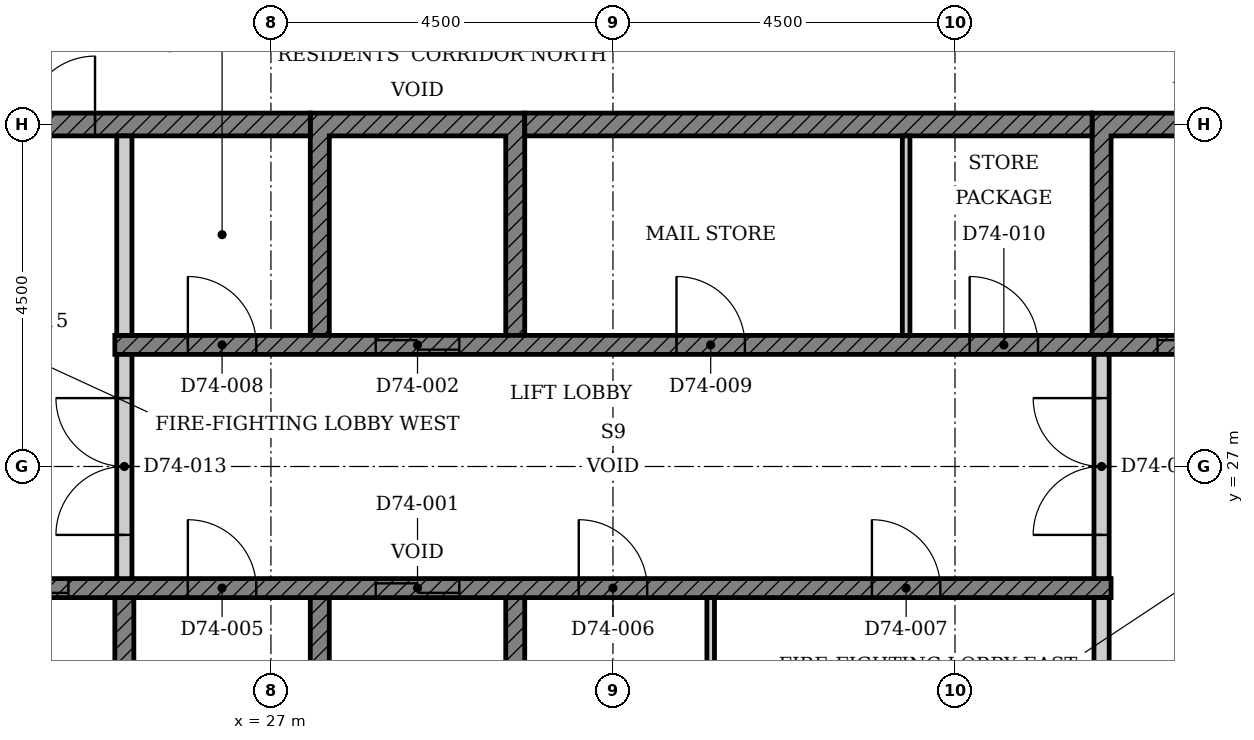
"""IFC4 building model, lengths in metres.
Left out: names, types, materials, properties, quantities, classifications, styles, units other than length and angle.
Written with IfcOpenShell. Run it as: python <this file> out.ifc"""

import sys

from ifc_helpers import new_model, si_unit, direction, frame, frame_2d, origin, place, context, subcontext, project, spatial, polyline, rectangle, outline, extrude, element, fill, save


model = new_model("IFC4")
c1 = context("Model", 3, precision=1e-05, world=origin(), true_north=direction((0.0, 1.0)))
c2 = subcontext(c1, "Body", "Model", "MODEL_VIEW")
j1 = project(units=[si_unit("LENGTHUNIT", "METRE"), si_unit("PLANEANGLEUNIT", "RADIAN")], contexts=[c1])
p1 = place(None, origin())
s1 = spatial("IfcSite", under=j1, at=p1, CompositionType="ELEMENT")
p2 = place(p1, origin())
s2 = spatial("IfcBuilding", under=s1, at=p2, CompositionType="ELEMENT")
p3 = place(p2, frame((0.0, 0.0, 290.8)))
s3 = spatial("IfcBuildingStorey", under=s2, at=p3, CompositionType="ELEMENT", Elevation=290.8)
p4 = place(p3, origin())
e1 = element("IfcWall", 1, at=p4, inside=s3, PredefinedType="SHEAR", context=c2, shape_type="SweptSolid", body=[
    extrude(outline(polyline([(22.375, 22.35), (25.197, 22.35), (25.197, 25.275), (24.947, 25.275), (24.947, 22.65), (22.625, 22.65), (22.625, 25.275), (22.375, 25.275), (22.375, 22.35)])), origin(), (0.0, 0.0, 1.0), 3.4),
])
p5 = place(p3, origin())
e2 = element("IfcWall", 2, at=p5, inside=s3, PredefinedType="SHEAR", context=c2, shape_type="SweptSolid", body=[
    extrude(outline(polyline([(27.518, 22.35), (30.339, 22.35), (30.339, 25.275), (30.089, 25.275), (30.089, 22.65), (27.768, 22.65), (27.768, 25.275), (27.518, 25.275), (27.518, 22.35)])), origin(), (0.0, 0.0, 1.0), 3.4),
])
p6 = place(p3, origin())
e3 = element("IfcWall", 3, at=p6, inside=s3, PredefinedType="SHEAR", context=c2, shape_type="SweptSolid", body=[
    extrude(outline(polyline([(27.518, 28.725), (27.768, 28.725), (27.768, 31.35), (30.089, 31.35), (30.089, 28.725), (30.339, 28.725), (30.339, 31.65), (27.518, 31.65), (27.518, 28.725)])), origin(), (0.0, 0.0, 1.0), 3.4),
])
p7 = place(p3, origin())
e4 = element("IfcWall", 4, at=p7, inside=s3, PredefinedType="SHEAR", context=c2, shape_type="SweptSolid", body=[
    extrude(outline(polyline([(37.803, 28.725), (38.053, 28.725), (38.053, 31.35), (40.375, 31.35), (40.375, 28.725), (40.625, 28.725), (40.625, 31.65), (37.803, 31.65), (37.803, 28.725)])), origin(), (0.0, 0.0, 1.0), 3.4),
])
p8 = place(p3, frame((18.15, 31.5, 0.0), z_axis=(0.0, 0.0, 1.0), x_axis=(1.0, 0.0, 0.0)))
e5 = element("IfcWall", 5, at=p8, inside=s3, PredefinedType="SHEAR", context=c2, shape_type="SweptSolid", body=[
    extrude(rectangle(XDim=9.368, YDim=0.3, at=frame_2d((4.684, 0.0))), origin(), (0.0, 0.0, 1.0), 3.4),
])
p9 = place(p8, frame((4.736, 0.0, 0.0)))
e6 = element("IfcOpeningElement", 6, at=p9, cuts=e5, PredefinedType="OPENING", context=c2, shape_type="SweptSolid", body=[
    extrude(rectangle(XDim=1.8, YDim=2.1, at=frame_2d((0.9, 1.05))), frame((0.0, 0.16, 0.0), z_axis=(0.0, -1.0, 0.0), x_axis=(1.0, 0.0, 0.0)), (0.0, 0.0, 1.0), 0.32),
])
p10 = place(p3, frame((30.339, 31.5, 0.0), z_axis=(0.0, 0.0, 1.0), x_axis=(1.0, 0.0, 0.0)))
e7 = element("IfcWall", 7, at=p10, inside=s3, PredefinedType="SHEAR", context=c2, shape_type="SweptSolid", body=[
    extrude(rectangle(XDim=7.464, YDim=0.3, at=frame_2d((3.732, 0.0))), origin(), (0.0, 0.0, 1.0), 3.4),
])
p11 = place(p3, frame((22.375, 25.4, 0.0), z_axis=(0.0, 0.0, 1.0), x_axis=(1.0, 0.0, 0.0)))
e8 = element("IfcWall", 8, at=p11, inside=s3, PredefinedType="SHEAR", context=c2, shape_type="SweptSolid", body=[
    extrude(rectangle(XDim=15.678, YDim=0.25, at=frame_2d((7.839, 0.0))), origin(), (0.0, 0.0, 1.0), 3.4),
])
p12 = place(p11, frame((6.004, 0.0, 0.0)))
e9 = element("IfcOpeningElement", 9, at=p12, cuts=e8, PredefinedType="OPENING", context=c2, shape_type="SweptSolid", body=[
    extrude(rectangle(XDim=1.1, YDim=2.1, at=frame_2d((0.55, 1.05))), frame((0.0, 0.135, 0.0), z_axis=(0.0, -1.0, 0.0), x_axis=(1.0, 0.0, 0.0)), (0.0, 0.0, 1.0), 0.27),
])
p13 = place(p11, frame((0.861, 0.0, 0.0)))
e10 = element("IfcOpeningElement", 10, at=p13, cuts=e8, PredefinedType="OPENING", context=c2, shape_type="SweptSolid", body=[
    extrude(rectangle(XDim=1.1, YDim=2.1, at=frame_2d((0.55, 1.05))), frame((0.0, 0.135, 0.0), z_axis=(0.0, -1.0, 0.0), x_axis=(1.0, 0.0, 0.0)), (0.0, 0.0, 1.0), 0.27),
])
p14 = place(p11, frame((3.532, 0.0, 0.0)))
e11 = element("IfcOpeningElement", 11, at=p14, cuts=e8, PredefinedType="OPENING", context=c2, shape_type="SweptSolid", body=[
    extrude(rectangle(XDim=0.9, YDim=2.1, at=frame_2d((0.45, 1.05))), frame((0.0, 0.135, 0.0), z_axis=(0.0, -1.0, 0.0), x_axis=(1.0, 0.0, 0.0)), (0.0, 0.0, 1.0), 0.27),
])
p15 = place(p11, frame((8.675, 0.0, 0.0)))
e12 = element("IfcOpeningElement", 12, at=p15, cuts=e8, PredefinedType="OPENING", context=c2, shape_type="SweptSolid", body=[
    extrude(rectangle(XDim=0.9, YDim=2.1, at=frame_2d((0.45, 1.05))), frame((0.0, 0.135, 0.0), z_axis=(0.0, -1.0, 0.0), x_axis=(1.0, 0.0, 0.0)), (0.0, 0.0, 1.0), 0.27),
])
p16 = place(p11, frame((12.532, 0.0, 0.0)))
e13 = element("IfcOpeningElement", 13, at=p16, cuts=e8, PredefinedType="OPENING", context=c2, shape_type="SweptSolid", body=[
    extrude(rectangle(XDim=0.9, YDim=2.1, at=frame_2d((0.45, 1.05))), frame((0.0, 0.135, 0.0), z_axis=(0.0, -1.0, 0.0), x_axis=(1.0, 0.0, 0.0)), (0.0, 0.0, 1.0), 0.27),
])
p17 = place(p3, frame((24.947, 28.6, 0.0), z_axis=(0.0, 0.0, 1.0), x_axis=(1.0, 0.0, 0.0)))
e14 = element("IfcWall", 14, at=p17, inside=s3, PredefinedType="SHEAR", context=c2, shape_type="SweptSolid", body=[
    extrude(rectangle(XDim=15.678, YDim=0.25, at=frame_2d((7.839, 0.0))), origin(), (0.0, 0.0, 1.0), 3.4),
])
p18 = place(p17, frame((3.432, 0.0, 0.0)))
e15 = element("IfcOpeningElement", 15, at=p18, cuts=e14, PredefinedType="OPENING", context=c2, shape_type="SweptSolid", body=[
    extrude(rectangle(XDim=1.1, YDim=2.1, at=frame_2d((0.55, 1.05))), frame((0.0, 0.135, 0.0), z_axis=(0.0, -1.0, 0.0), x_axis=(1.0, 0.0, 0.0)), (0.0, 0.0, 1.0), 0.27),
])
p19 = place(p17, frame((13.718, 0.0, 0.0)))
e16 = element("IfcOpeningElement", 16, at=p19, cuts=e14, PredefinedType="OPENING", context=c2, shape_type="SweptSolid", body=[
    extrude(rectangle(XDim=1.1, YDim=2.1, at=frame_2d((0.55, 1.05))), frame((0.0, 0.135, 0.0), z_axis=(0.0, -1.0, 0.0), x_axis=(1.0, 0.0, 0.0)), (0.0, 0.0, 1.0), 0.27),
])
p20 = place(p17, frame((0.961, 0.0, 0.0)))
e17 = element("IfcOpeningElement", 17, at=p20, cuts=e14, PredefinedType="OPENING", context=c2, shape_type="SweptSolid", body=[
    extrude(rectangle(XDim=0.9, YDim=2.1, at=frame_2d((0.45, 1.05))), frame((0.0, 0.135, 0.0), z_axis=(0.0, -1.0, 0.0), x_axis=(1.0, 0.0, 0.0)), (0.0, 0.0, 1.0), 0.27),
])
p21 = place(p17, frame((7.389, 0.0, 0.0)))
e18 = element("IfcOpeningElement", 18, at=p21, cuts=e14, PredefinedType="OPENING", context=c2, shape_type="SweptSolid", body=[
    extrude(rectangle(XDim=0.9, YDim=2.1, at=frame_2d((0.45, 1.05))), frame((0.0, 0.135, 0.0), z_axis=(0.0, -1.0, 0.0), x_axis=(1.0, 0.0, 0.0)), (0.0, 0.0, 1.0), 0.27),
])
p22 = place(p17, frame((11.246, 0.0, 0.0)))
e19 = element("IfcOpeningElement", 19, at=p22, cuts=e14, PredefinedType="OPENING", context=c2, shape_type="SweptSolid", body=[
    extrude(rectangle(XDim=0.9, YDim=2.1, at=frame_2d((0.45, 1.05))), frame((0.0, 0.135, 0.0), z_axis=(0.0, -1.0, 0.0), x_axis=(1.0, 0.0, 0.0)), (0.0, 0.0, 1.0), 0.27),
])
p23 = place(p3, frame((37.928, 22.65, 0.0), z_axis=(0.0, 0.0, 1.0), x_axis=(0.0, 1.0, 0.0)))
e20 = element("IfcWall", 20, at=p23, inside=s3, PredefinedType="PARTITIONING", context=c2, shape_type="SweptSolid", body=[
    extrude(rectangle(XDim=2.625, YDim=0.2, at=frame_2d((1.312, 0.0))), origin(), (0.0, 0.0, 1.0), 3.4),
])
p24 = place(p3, frame((32.786, 22.65, 0.0), z_axis=(0.0, 0.0, 1.0), x_axis=(0.0, 1.0, 0.0)))
e21 = element("IfcWall", 21, at=p24, inside=s3, PredefinedType="PARTITIONING", context=c2, shape_type="SweptSolid", body=[
    extrude(rectangle(XDim=2.625, YDim=0.1, at=frame_2d((1.312, 0.0))), origin(), (0.0, 0.0, 1.0), 3.4),
])
p25 = place(p3, frame((25.072, 28.725, 0.0), z_axis=(0.0, 0.0, 1.0), x_axis=(0.0, 1.0, 0.0)))
e22 = element("IfcWall", 22, at=p25, inside=s3, PredefinedType="PARTITIONING", context=c2, shape_type="SweptSolid", body=[
    extrude(rectangle(XDim=2.625, YDim=0.2, at=frame_2d((1.312, 0.0))), origin(), (0.0, 0.0, 1.0), 3.4),
])
p26 = place(p3, frame((35.357, 28.725, 0.0), z_axis=(0.0, 0.0, 1.0), x_axis=(0.0, 1.0, 0.0)))
e23 = element("IfcWall", 23, at=p26, inside=s3, PredefinedType="PARTITIONING", context=c2, shape_type="SweptSolid", body=[
    extrude(rectangle(XDim=2.625, YDim=0.1, at=frame_2d((1.312, 0.0))), origin(), (0.0, 0.0, 1.0), 3.4),
])
p27 = place(p3, frame((25.072, 25.525, 0.0), z_axis=(0.0, 0.0, 1.0), x_axis=(0.0, 1.0, 0.0)))
e24 = element("IfcWall", 24, at=p27, inside=s3, PredefinedType="PARTITIONING", context=c2, shape_type="SweptSolid", body=[
    extrude(rectangle(XDim=2.95, YDim=0.2, at=frame_2d((1.475, 0.0))), origin(), (0.0, 0.0, 1.0), 3.4),
])
p28 = place(p27, frame((0.575, 0.0, 0.0)))
e25 = element("IfcOpeningElement", 25, at=p28, cuts=e24, PredefinedType="OPENING", context=c2, shape_type="SweptSolid", body=[
    extrude(rectangle(XDim=1.8, YDim=2.1, at=frame_2d((0.9, 1.05))), frame((0.0, 0.11, 0.0), z_axis=(0.0, -1.0, 0.0), x_axis=(1.0, 0.0, 0.0)), (0.0, 0.0, 1.0), 0.22),
])
p29 = place(p3, frame((37.928, 25.525, 0.0), z_axis=(0.0, 0.0, 1.0), x_axis=(0.0, 1.0, 0.0)))
e26 = element("IfcWall", 26, at=p29, inside=s3, PredefinedType="PARTITIONING", context=c2, shape_type="SweptSolid", body=[
    extrude(rectangle(XDim=2.95, YDim=0.2, at=frame_2d((1.475, 0.0))), origin(), (0.0, 0.0, 1.0), 3.4),
])
p30 = place(p29, frame((0.575, 0.0, 0.0)))
e27 = element("IfcOpeningElement", 27, at=p30, cuts=e26, PredefinedType="OPENING", context=c2, shape_type="SweptSolid", body=[
    extrude(rectangle(XDim=1.8, YDim=2.1, at=frame_2d((0.9, 1.05))), frame((0.0, 0.11, 0.0), z_axis=(0.0, -1.0, 0.0), x_axis=(1.0, 0.0, 0.0)), (0.0, 0.0, 1.0), 0.22),
])
p31 = place(p12, origin())
e28 = element("IfcDoor", 28, at=p31, inside=s3, OperationType="DOUBLE_DOOR_SLIDING", PredefinedType="DOOR", context=c2, shape_type="SweptSolid", body=[
    extrude(rectangle(XDim=1.1, YDim=2.1, at=frame_2d((0.55, 1.05))), frame((0.0, 0.025, 0.0), z_axis=(0.0, -1.0, 0.0), x_axis=(1.0, 0.0, 0.0)), (0.0, 0.0, 1.0), 0.05),
])
fill(e9, e28)
p32 = place(p18, origin())
e29 = element("IfcDoor", 29, at=p32, inside=s3, OperationType="DOUBLE_DOOR_SLIDING", PredefinedType="DOOR", context=c2, shape_type="SweptSolid", body=[
    extrude(rectangle(XDim=1.1, YDim=2.1, at=frame_2d((0.55, 1.05))), frame((0.0, 0.025, 0.0), z_axis=(0.0, -1.0, 0.0), x_axis=(1.0, 0.0, 0.0)), (0.0, 0.0, 1.0), 0.05),
])
fill(e15, e29)
p33 = place(p13, origin())
e30 = element("IfcDoor", 30, at=p33, inside=s3, OperationType="DOUBLE_DOOR_SLIDING", PredefinedType="DOOR", context=c2, shape_type="SweptSolid", body=[
    extrude(rectangle(XDim=1.1, YDim=2.1, at=frame_2d((0.55, 1.05))), frame((0.0, 0.025, 0.0), z_axis=(0.0, -1.0, 0.0), x_axis=(1.0, 0.0, 0.0)), (0.0, 0.0, 1.0), 0.05),
])
fill(e10, e30)
p34 = place(p19, origin())
e31 = element("IfcDoor", 31, at=p34, inside=s3, OperationType="DOUBLE_DOOR_SLIDING", PredefinedType="DOOR", context=c2, shape_type="SweptSolid", body=[
    extrude(rectangle(XDim=1.1, YDim=2.1, at=frame_2d((0.55, 1.05))), frame((0.0, 0.025, 0.0), z_axis=(0.0, -1.0, 0.0), x_axis=(1.0, 0.0, 0.0)), (0.0, 0.0, 1.0), 0.05),
])
fill(e16, e31)
p35 = place(p14, origin())
e32 = element("IfcDoor", 32, at=p35, inside=s3, OperationType="SINGLE_SWING_LEFT", PredefinedType="DOOR", context=c2, shape_type="SweptSolid", body=[
    extrude(rectangle(XDim=0.9, YDim=2.1, at=frame_2d((0.45, 1.05))), frame((0.0, 0.025, 0.0), z_axis=(0.0, -1.0, 0.0), x_axis=(1.0, 0.0, 0.0)), (0.0, 0.0, 1.0), 0.05),
])
fill(e11, e32)
p36 = place(p15, origin())
e33 = element("IfcDoor", 33, at=p36, inside=s3, OperationType="SINGLE_SWING_LEFT", PredefinedType="DOOR", context=c2, shape_type="SweptSolid", body=[
    extrude(rectangle(XDim=0.9, YDim=2.1, at=frame_2d((0.45, 1.05))), frame((0.0, 0.025, 0.0), z_axis=(0.0, -1.0, 0.0), x_axis=(1.0, 0.0, 0.0)), (0.0, 0.0, 1.0), 0.05),
])
fill(e12, e33)
p37 = place(p16, origin())
e34 = element("IfcDoor", 34, at=p37, inside=s3, OperationType="SINGLE_SWING_LEFT", PredefinedType="DOOR", context=c2, shape_type="SweptSolid", body=[
    extrude(rectangle(XDim=0.9, YDim=2.1, at=frame_2d((0.45, 1.05))), frame((0.0, 0.025, 0.0), z_axis=(0.0, -1.0, 0.0), x_axis=(1.0, 0.0, 0.0)), (0.0, 0.0, 1.0), 0.05),
])
fill(e13, e34)
p38 = place(p20, origin())
e35 = element("IfcDoor", 35, at=p38, inside=s3, OperationType="SINGLE_SWING_LEFT", PredefinedType="DOOR", context=c2, shape_type="SweptSolid", body=[
    extrude(rectangle(XDim=0.9, YDim=2.1, at=frame_2d((0.45, 1.05))), frame((0.0, 0.025, 0.0), z_axis=(0.0, -1.0, 0.0), x_axis=(1.0, 0.0, 0.0)), (0.0, 0.0, 1.0), 0.05),
])
fill(e17, e35)
p39 = place(p21, origin())
e36 = element("IfcDoor", 36, at=p39, inside=s3, OperationType="SINGLE_SWING_LEFT", PredefinedType="DOOR", context=c2, shape_type="SweptSolid", body=[
    extrude(rectangle(XDim=0.9, YDim=2.1, at=frame_2d((0.45, 1.05))), frame((0.0, 0.025, 0.0), z_axis=(0.0, -1.0, 0.0), x_axis=(1.0, 0.0, 0.0)), (0.0, 0.0, 1.0), 0.05),
])
fill(e18, e36)
p40 = place(p22, origin())
e37 = element("IfcDoor", 37, at=p40, inside=s3, OperationType="SINGLE_SWING_LEFT", PredefinedType="DOOR", context=c2, shape_type="SweptSolid", body=[
    extrude(rectangle(XDim=0.9, YDim=2.1, at=frame_2d((0.45, 1.05))), frame((0.0, 0.025, 0.0), z_axis=(0.0, -1.0, 0.0), x_axis=(1.0, 0.0, 0.0)), (0.0, 0.0, 1.0), 0.05),
])
fill(e19, e37)
p41 = place(p28, origin())
e38 = element("IfcDoor", 38, at=p41, inside=s3, OperationType="DOUBLE_DOOR_SINGLE_SWING", PredefinedType="DOOR", context=c2, shape_type="SweptSolid", body=[
    extrude(rectangle(XDim=1.8, YDim=2.1, at=frame_2d((0.9, 1.05))), frame((0.0, 0.025, 0.0), z_axis=(0.0, -1.0, 0.0), x_axis=(1.0, 0.0, 0.0)), (0.0, 0.0, 1.0), 0.05),
])
fill(e25, e38)
p42 = place(p30, origin())
e39 = element("IfcDoor", 39, at=p42, inside=s3, OperationType="DOUBLE_DOOR_SINGLE_SWING", PredefinedType="DOOR", context=c2, shape_type="SweptSolid", body=[
    extrude(rectangle(XDim=1.8, YDim=2.1, at=frame_2d((0.9, 1.05))), frame((0.0, 0.025, 0.0), z_axis=(0.0, -1.0, 0.0), x_axis=(1.0, 0.0, 0.0)), (0.0, 0.0, 1.0), 0.05),
])
fill(e27, e39)
p43 = place(p9, origin())
e40 = element("IfcDoor", 40, at=p43, inside=s3, OperationType="DOUBLE_DOOR_SINGLE_SWING", PredefinedType="DOOR", context=c2, shape_type="SweptSolid", body=[
    extrude(rectangle(XDim=1.8, YDim=2.1, at=frame_2d((0.9, 1.05))), frame((0.0, 0.025, 0.0), z_axis=(0.0, -1.0, 0.0), x_axis=(1.0, 0.0, 0.0)), (0.0, 0.0, 1.0), 0.05),
])
fill(e6, e40)
save(model, sys.argv[1])
